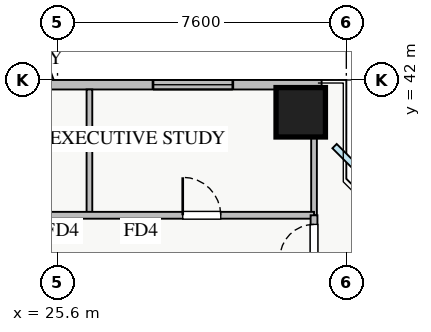
"""IFC4 building model, lengths in metres.
Left out: names, types, materials, properties, quantities, classifications, styles, units other than length and angle.
Written with IfcOpenShell. Run it as: python <this file> out.ifc"""

import sys

from ifc_helpers import new_model, si_unit, direction, frame, frame_2d, origin, origin_2d, place, context, subcontext, project, spatial, rectangle, extrude, source, transform, mapped, element, fill, save


model = new_model("IFC4")
c1 = context("Model", 3, precision=1e-05, world=origin(), true_north=direction((0.0, 1.0)))
c2 = subcontext(c1, "Body", "Model", "MODEL_VIEW")
j1 = project(units=[si_unit("LENGTHUNIT", "METRE"), si_unit("PLANEANGLEUNIT", "RADIAN")], contexts=[c1])
p1 = place(None, origin())
s1 = spatial("IfcSite", under=j1, at=p1, CompositionType="ELEMENT")
p2 = place(p1, origin())
s2 = spatial("IfcBuilding", under=s1, at=p2, CompositionType="ELEMENT")
p3 = place(p2, frame((0.0, 0.0, 39.25)))
s3 = spatial("IfcBuildingStorey", under=s2, at=p3, CompositionType="ELEMENT", Elevation=39.25)
m1 = source(origin(), c2, "Body", "SweptSolid", [
    extrude(rectangle(XDim=1.3, YDim=1.3, at=origin_2d()), origin(), (0.0, 0.0, 1.0), 3.25),
])
p4 = place(p3, frame((32.0, 41.15, 0.0), z_axis=(0.0, 0.0, 1.0), x_axis=(1.0, 0.0, 0.0)))
e1 = element("IfcColumn", 1, at=p4, inside=s3, PredefinedType="COLUMN", context=c2, shape_type="MappedRepresentation", body=[
    mapped(m1, transform((0.0, 0.0, 0.0), x_axis=(1.0, 0.0, 0.0), y_axis=(0.0, 1.0, 0.0), z_axis=(0.0, 0.0, 1.0), scale=1.0)),
])
p5 = place(p3, frame((5.45, 41.875, 0.0), z_axis=(0.0, 0.0, 1.0), x_axis=(1.0, 0.0, 0.0)))
e2 = element("IfcWall", 2, at=p5, inside=s3, PredefinedType="STANDARD", context=c2, shape_type="SweptSolid", body=[
    extrude(rectangle(XDim=27.1, YDim=0.25, at=frame_2d((13.55, 0.0))), origin(), (0.0, 0.0, 1.0), 2.61),
])
p6 = place(p5, frame((14.4, 0.0, 0.0)))
e3 = element("IfcOpeningElement", 3, at=p6, cuts=e2, PredefinedType="OPENING", context=c2, shape_type="SweptSolid", body=[
    extrude(rectangle(XDim=1.2, YDim=2.1, at=frame_2d((0.6, 1.05))), frame((0.0, 0.135, 0.0), z_axis=(0.0, -1.0, 0.0), x_axis=(1.0, 0.0, 0.0)), (0.0, 0.0, 1.0), 0.27),
])
p7 = place(p5, frame((1.45, 0.0, 0.9)))
e4 = element("IfcOpeningElement", 4, at=p7, cuts=e2, PredefinedType="OPENING", context=c2, shape_type="SweptSolid", body=[
    extrude(rectangle(XDim=1.5, YDim=1.5, at=frame_2d((0.75, 0.75))), frame((0.0, 0.135, 0.0), z_axis=(0.0, -1.0, 0.0), x_axis=(1.0, 0.0, 0.0)), (0.0, 0.0, 1.0), 0.27),
])
p8 = place(p5, frame((7.82, 0.0, 0.9)))
e5 = element("IfcOpeningElement", 5, at=p8, cuts=e2, PredefinedType="OPENING", context=c2, shape_type="SweptSolid", body=[
    extrude(rectangle(XDim=1.8, YDim=1.5, at=frame_2d((0.9, 0.75))), frame((0.0, 0.135, 0.0), z_axis=(0.0, -1.0, 0.0), x_axis=(1.0, 0.0, 0.0)), (0.0, 0.0, 1.0), 0.27),
])
p9 = place(p5, frame((17.92, 0.0, 0.9)))
e6 = element("IfcOpeningElement", 6, at=p9, cuts=e2, PredefinedType="OPENING", context=c2, shape_type="SweptSolid", body=[
    extrude(rectangle(XDim=1.5, YDim=1.5, at=frame_2d((0.75, 0.75))), frame((0.0, 0.135, 0.0), z_axis=(0.0, -1.0, 0.0), x_axis=(1.0, 0.0, 0.0)), (0.0, 0.0, 1.0), 0.27),
])
p10 = place(p5, frame((22.663, 0.0, 0.9)))
e7 = element("IfcOpeningElement", 7, at=p10, cuts=e2, PredefinedType="OPENING", context=c2, shape_type="SweptSolid", body=[
    extrude(rectangle(XDim=2.1, YDim=1.48, at=frame_2d((1.05, 0.74))), frame((0.0, 0.135, 0.0), z_axis=(0.0, -1.0, 0.0), x_axis=(1.0, 0.0, 0.0)), (0.0, 0.0, 1.0), 0.27),
])
p11 = place(p5, frame((5.084, 0.0, 0.9)))
e8 = element("IfcOpeningElement", 8, at=p11, cuts=e2, PredefinedType="OPENING", context=c2, shape_type="SweptSolid", body=[
    extrude(rectangle(XDim=2.4, YDim=1.5, at=frame_2d((1.2, 0.75))), frame((0.0, 0.135, 0.0), z_axis=(0.0, -1.0, 0.0), x_axis=(1.0, 0.0, 0.0)), (0.0, 0.0, 1.0), 0.27),
])
p12 = place(p5, frame((11.002, 0.0, 0.9)))
e9 = element("IfcOpeningElement", 9, at=p12, cuts=e2, PredefinedType="OPENING", context=c2, shape_type="SweptSolid", body=[
    extrude(rectangle(XDim=2.4, YDim=1.5, at=frame_2d((1.2, 0.75))), frame((0.0, 0.135, 0.0), z_axis=(0.0, -1.0, 0.0), x_axis=(1.0, 0.0, 0.0)), (0.0, 0.0, 1.0), 0.27),
])
for number, where, z_axis, x_axis in (
    (10, (26.44, 38.44, 0.0), (0.0, 0.0, 1.0), (0.0, 1.0, 0.0)),
    (11, (32.35, 38.44, 0.0), (0.0, 0.0, 1.0), (0.0, 1.0, 0.0)),
):
    element("IfcWall", number, at=place(p3, frame(where, z_axis=z_axis, x_axis=x_axis)), inside=s3, PredefinedType="PARTITIONING", context=c2, shape_type="SweptSolid", body=[
        extrude(rectangle(XDim=3.31, YDim=0.15, at=frame_2d((1.655, 0.0))), origin(), (0.0, 0.0, 1.0), 3.07),
    ])
p13 = place(p3, frame((8.72, 38.44, 0.0), z_axis=(0.0, 0.0, 1.0), x_axis=(1.0, 0.0, 0.0)))
e12 = element("IfcWall", 12, at=p13, inside=s3, PredefinedType="PARTITIONING", context=c2, shape_type="SweptSolid", body=[
    extrude(rectangle(XDim=23.63, YDim=0.18, at=frame_2d((11.815, 0.0))), origin(), (0.0, 0.0, 1.0), 3.07),
])
p14 = place(p13, frame((2.86, 0.0, 0.0)))
e13 = element("IfcOpeningElement", 13, at=p14, cuts=e12, PredefinedType="OPENING", context=c2, shape_type="SweptSolid", body=[
    extrude(rectangle(XDim=1.0, YDim=2.05, at=frame_2d((0.5, 1.025))), frame((0.0, 0.1, 0.0), z_axis=(0.0, -1.0, 0.0), x_axis=(1.0, 0.0, 0.0)), (0.0, 0.0, 1.0), 0.2),
])
p15 = place(p13, frame((9.4, 0.0, 0.0)))
e14 = element("IfcOpeningElement", 14, at=p15, cuts=e12, PredefinedType="OPENING", context=c2, shape_type="SweptSolid", body=[
    extrude(rectangle(XDim=1.0, YDim=2.05, at=frame_2d((0.5, 1.025))), frame((0.0, 0.1, 0.0), z_axis=(0.0, -1.0, 0.0), x_axis=(1.0, 0.0, 0.0)), (0.0, 0.0, 1.0), 0.2),
])
p16 = place(p13, frame((14.9, 0.0, 0.0)))
e15 = element("IfcOpeningElement", 15, at=p16, cuts=e12, PredefinedType="OPENING", context=c2, shape_type="SweptSolid", body=[
    extrude(rectangle(XDim=1.0, YDim=2.05, at=frame_2d((0.5, 1.025))), frame((0.0, 0.1, 0.0), z_axis=(0.0, -1.0, 0.0), x_axis=(1.0, 0.0, 0.0)), (0.0, 0.0, 1.0), 0.2),
])
p17 = place(p13, frame((20.175, 0.0, 0.0)))
e16 = element("IfcOpeningElement", 16, at=p17, cuts=e12, PredefinedType="OPENING", context=c2, shape_type="SweptSolid", body=[
    extrude(rectangle(XDim=1.0, YDim=2.05, at=frame_2d((0.5, 1.025))), frame((0.0, 0.1, 0.0), z_axis=(0.0, -1.0, 0.0), x_axis=(1.0, 0.0, 0.0)), (0.0, 0.0, 1.0), 0.2),
])
p18 = place(p3, frame((32.35, 7.21, 0.0), z_axis=(0.0, 0.0, 1.0), x_axis=(0.0, 1.0, 0.0)))
e17 = element("IfcWall", 17, at=p18, inside=s3, PredefinedType="PARTITIONING", context=c2, shape_type="SweptSolid", body=[
    extrude(rectangle(XDim=31.23, YDim=0.18, at=frame_2d((15.615, 0.0))), origin(), (0.0, 0.0, 1.0), 2.821),
])
p19 = place(p18, frame((30.09, 0.0, 0.0)))
e18 = element("IfcOpeningElement", 18, at=p19, cuts=e17, PredefinedType="OPENING", context=c2, shape_type="SweptSolid", body=[
    extrude(rectangle(XDim=0.9, YDim=2.05, at=frame_2d((0.45, 1.025))), frame((0.0, 0.1, 0.0), z_axis=(0.0, -1.0, 0.0), x_axis=(1.0, 0.0, 0.0)), (0.0, 0.0, 1.0), 0.2),
])
p20 = place(p18, frame((0.415, 0.0, 0.0)))
e19 = element("IfcOpeningElement", 19, at=p20, cuts=e17, PredefinedType="OPENING", context=c2, shape_type="SweptSolid", body=[
    extrude(rectangle(XDim=0.9, YDim=2.05, at=frame_2d((0.45, 1.025))), frame((0.0, 0.1, 0.0), z_axis=(0.0, -1.0, 0.0), x_axis=(1.0, 0.0, 0.0)), (0.0, 0.0, 1.0), 0.2),
])
p21 = place(p18, frame((6.305, 0.0, 0.0)))
e20 = element("IfcOpeningElement", 20, at=p21, cuts=e17, PredefinedType="OPENING", context=c2, shape_type="SweptSolid", body=[
    extrude(rectangle(XDim=1.0, YDim=2.05, at=frame_2d((0.5, 1.025))), frame((0.0, 0.1, 0.0), z_axis=(0.0, -1.0, 0.0), x_axis=(1.0, 0.0, 0.0)), (0.0, 0.0, 1.0), 0.2),
])
p22 = place(p18, frame((13.205, 0.0, 0.0)))
e21 = element("IfcOpeningElement", 21, at=p22, cuts=e17, PredefinedType="OPENING", context=c2, shape_type="SweptSolid", body=[
    extrude(rectangle(XDim=1.0, YDim=2.05, at=frame_2d((0.5, 1.025))), frame((0.0, 0.1, 0.0), z_axis=(0.0, -1.0, 0.0), x_axis=(1.0, 0.0, 0.0)), (0.0, 0.0, 1.0), 0.2),
])
p23 = place(p18, frame((22.5, 0.0, 0.0)))
e22 = element("IfcOpeningElement", 22, at=p23, cuts=e17, PredefinedType="OPENING", context=c2, shape_type="SweptSolid", body=[
    extrude(rectangle(XDim=1.0, YDim=2.05, at=frame_2d((0.5, 1.025))), frame((0.0, 0.1, 0.0), z_axis=(0.0, -1.0, 0.0), x_axis=(1.0, 0.0, 0.0)), (0.0, 0.0, 1.0), 0.2),
])
m2 = source(origin(), c2, "Body", "SweptSolid", [
    extrude(rectangle(XDim=2.1, YDim=1.48, at=frame_2d((1.05, 0.74))), frame((0.0, 0.03, 0.0), z_axis=(0.0, -1.0, 0.0), x_axis=(1.0, 0.0, 0.0)), (0.0, 0.0, 1.0), 0.06),
])
p24 = place(p10, origin())
e23 = element("IfcWindow", 23, at=p24, inside=s3, PartitioningType="TRIPLE_PANEL_VERTICAL", PredefinedType="WINDOW", context=c2, shape_type="MappedRepresentation", body=[
    mapped(m2, transform((0.0, 0.0, 0.0), x_axis=(1.0, 0.0, 0.0), y_axis=(0.0, 1.0, 0.0), z_axis=(0.0, 0.0, 1.0), scale=1.0)),
])
fill(e7, e23)
m3 = source(origin(), c2, "Body", "SweptSolid", [
    extrude(rectangle(XDim=1.0, YDim=2.05, at=frame_2d((0.5, 1.025))), frame((0.0, 0.025, 0.0), z_axis=(0.0, -1.0, 0.0), x_axis=(1.0, 0.0, 0.0)), (0.0, 0.0, 1.0), 0.05),
])
p25 = place(p17, origin())
e24 = element("IfcDoor", 24, at=p25, inside=s3, OperationType="SINGLE_SWING_LEFT", PredefinedType="DOOR", context=c2, shape_type="MappedRepresentation", body=[
    mapped(m3, transform((0.0, 0.0, 0.0), x_axis=(1.0, 0.0, 0.0), y_axis=(0.0, 1.0, 0.0), z_axis=(0.0, 0.0, 1.0), scale=1.0)),
])
fill(e16, e24)
m4 = source(origin(), c2, "Body", "SweptSolid", [
    extrude(rectangle(XDim=0.9, YDim=2.05, at=frame_2d((0.45, 1.025))), frame((0.0, 0.025, 0.0), z_axis=(0.0, -1.0, 0.0), x_axis=(1.0, 0.0, 0.0)), (0.0, 0.0, 1.0), 0.05),
])
p26 = place(p19, origin())
e25 = element("IfcDoor", 25, at=p26, inside=s3, OperationType="SINGLE_SWING_LEFT", PredefinedType="DOOR", context=c2, shape_type="MappedRepresentation", body=[
    mapped(m4, transform((0.0, 0.0, 0.0), x_axis=(1.0, 0.0, 0.0), y_axis=(0.0, 1.0, 0.0), z_axis=(0.0, 0.0, 1.0), scale=1.0)),
])
fill(e18, e25)
save(model, sys.argv[1])
